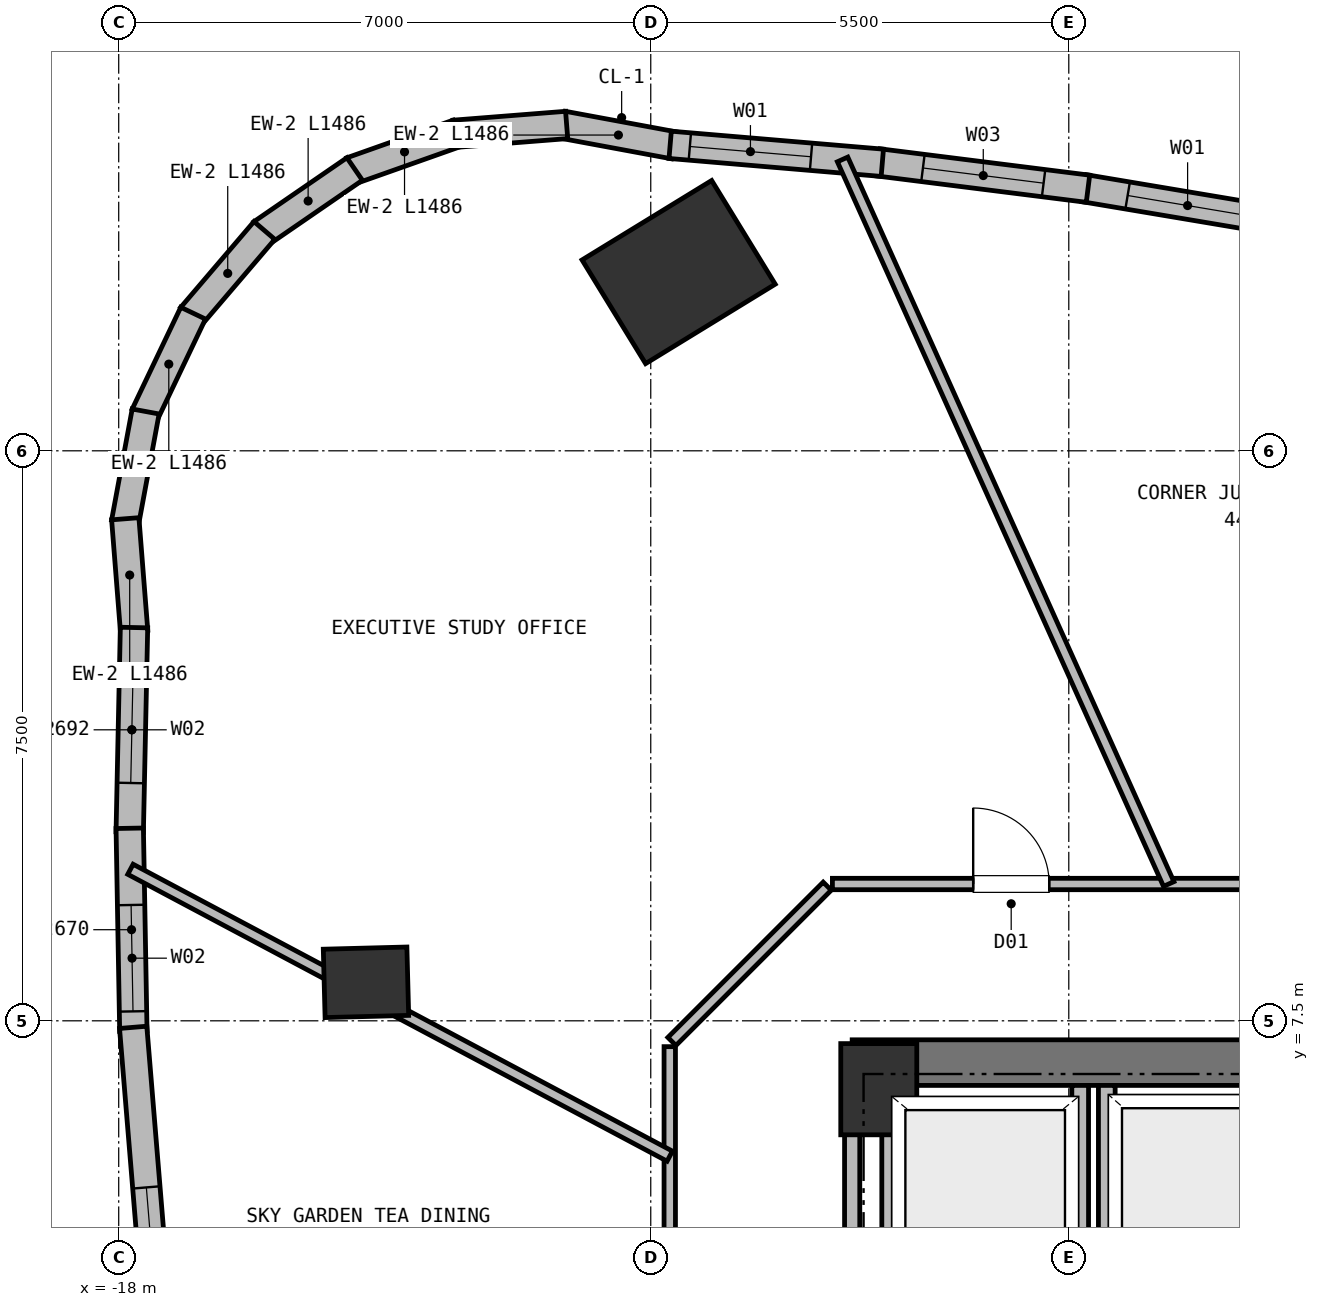
"""IFC4 building model, lengths in metres.
Left out: names, types, materials, properties, quantities, classifications, styles, units other than length and angle.
Written with IfcOpenShell. Run it as: python <this file> out.ifc"""

import sys

from ifc_helpers import new_model, si_unit, direction, frame, frame_2d, origin, origin_2d, place, context, subcontext, project, spatial, rectangle, extrude, element, fill, save


model = new_model("IFC4")
c1 = context("Model", 3, precision=1e-05, world=origin(), true_north=direction((0.0, 1.0)))
c2 = subcontext(c1, "Body", "Model", "MODEL_VIEW")
j1 = project(units=[si_unit("LENGTHUNIT", "METRE"), si_unit("PLANEANGLEUNIT", "RADIAN")], contexts=[c1])
p1 = place(None, origin())
s1 = spatial("IfcSite", under=j1, at=p1, CompositionType="ELEMENT")
p2 = place(p1, origin())
s2 = spatial("IfcBuilding", under=s1, at=p2, CompositionType="ELEMENT")
p3 = place(p2, frame((0.0, 0.0, 164.75)))
s3 = spatial("IfcBuildingStorey", under=s2, at=p3, CompositionType="ELEMENT", Elevation=164.75)
p4 = place(p3, frame((-8.0, 6.6, 0.0), z_axis=(0.0, 0.0, 1.0), x_axis=(1.0, 0.0, 0.0)))
e1 = element("IfcColumn", 1, at=p4, inside=s3, PredefinedType="COLUMN", context=c2, shape_type="SweptSolid", body=[
    extrude(rectangle(XDim=1.0, YDim=1.2, at=origin_2d()), origin(), (0.0, 0.0, 1.0), 3.75),
])
p5 = place(p3, frame((-8.35, 6.95, 0.0), z_axis=(0.0, 0.0, 1.0), x_axis=(1.0, 0.0, 0.0)))
e2 = element("IfcWall", 2, at=p5, inside=s3, PredefinedType="SHEAR", context=c2, shape_type="SweptSolid", body=[
    extrude(rectangle(XDim=16.7, YDim=0.6, at=frame_2d((8.35, 0.0))), origin(), (0.0, 0.0, 1.0), 3.44),
])
p6 = place(p3, frame((-10.633, 17.352, 0.0), z_axis=(0.0, 0.0, 1.0), x_axis=(-0.522498564716, 0.852640164354, 0.0)))
e3 = element("IfcColumn", 3, at=p6, inside=s3, PredefinedType="COLUMN", context=c2, shape_type="SweptSolid", body=[
    extrude(rectangle(XDim=1.6, YDim=2.0, at=origin_2d()), origin(), (0.0, 0.0, 1.0), 3.75),
])
p7 = place(p3, frame((-14.747, 8.007, 0.0), z_axis=(0.0, 0.0, 1.0), x_axis=(-0.026176948308, 0.999657324976, 0.0)))
e4 = element("IfcColumn", 4, at=p7, inside=s3, PredefinedType="COLUMN", context=c2, shape_type="SweptSolid", body=[
    extrude(rectangle(XDim=0.9, YDim=1.1, at=origin_2d()), origin(), (0.0, 0.0, 1.0), 3.75),
])
for number, where, z_axis, x_axis in (
    (5, (-12.156, 19.29, 0.0), (0.0, 0.0, 1.0), (0.983, -0.182, 0.0)),
    (6, (-13.588, 19.171, 0.0), (0.0, 0.0, 1.0), (0.997, 0.079, 0.0)),
):
    element("IfcWall", number, at=place(p3, frame(where, z_axis=z_axis, x_axis=x_axis)), inside=s3, PredefinedType="SOLIDWALL", context=c2, shape_type="SweptSolid", body=[
        extrude(rectangle(XDim=1.486, YDim=0.36, at=frame_2d((0.743, 0.0))), origin(), (0.0, 0.0, 1.0), 3.44),
    ])
p8 = place(p3, frame((-14.94, 18.685, 0.0), z_axis=(0.0, 0.0, 1.0), x_axis=(0.942653080659, 0.333774129501, 0.0)))
e7 = element("IfcWall", 7, at=p8, inside=s3, PredefinedType="SOLIDWALL", context=c2, shape_type="SweptSolid", body=[
    extrude(rectangle(XDim=1.486, YDim=0.36, at=frame_2d((0.743, 0.0))), origin(), (0.0, 0.0, 1.0), 3.44),
])
for number, where, z_axis, x_axis in (
    (8, (-16.12, 17.866, 0.0), (0.0, 0.0, 1.0), (0.824, 0.566, 0.0)),
    (9, (-17.048, 16.77, 0.0), (0.0, 0.0, 1.0), (0.649, 0.76, 0.0)),
    (10, (-17.661, 15.47, 0.0), (0.0, 0.0, 1.0), (0.431, 0.903, 0.0)),
):
    element("IfcWall", number, at=place(p3, frame(where, z_axis=z_axis, x_axis=x_axis)), inside=s3, PredefinedType="SOLIDWALL", context=c2, shape_type="SweptSolid", body=[
        extrude(rectangle(XDim=1.486, YDim=0.36, at=frame_2d((0.743, 0.0))), origin(), (0.0, 0.0, 1.0), 3.44),
    ])
p9 = place(p3, frame((-17.916, 14.056, 0.0), z_axis=(0.0, 0.0, 1.0), x_axis=(0.182254034422, 0.983251476956, 0.0)))
e11 = element("IfcWall", 11, at=p9, inside=s3, PredefinedType="SOLIDWALL", context=c2, shape_type="SweptSolid", body=[
    extrude(rectangle(XDim=1.486, YDim=0.36, at=frame_2d((0.743, 0.0))), origin(), (0.0, 0.0, 1.0), 3.44),
])
p10 = place(p3, frame((-17.797, 12.625, 0.0), z_axis=(0.0, 0.0, 1.0), x_axis=(-0.078543482647, 0.996910688745, 0.0)))
e12 = element("IfcWall", 12, at=p10, inside=s3, PredefinedType="SOLIDWALL", context=c2, shape_type="SweptSolid", body=[
    extrude(rectangle(XDim=1.486, YDim=0.36, at=frame_2d((0.743, 0.0))), origin(), (0.0, 0.0, 1.0), 3.44),
])
p11 = place(p3, frame((-17.855, 9.983, 0.0), z_axis=(0.0, 0.0, 1.0), x_axis=(0.021042241885, 0.999778587516, 0.0)))
e13 = element("IfcWall", 13, at=p11, inside=s3, PredefinedType="SOLIDWALL", context=c2, shape_type="SweptSolid", body=[
    extrude(rectangle(XDim=2.692, YDim=0.36, at=frame_2d((1.346, 0.0))), origin(), (0.0, 0.0, 1.0), 3.44),
])
p12 = place(p11, frame((0.646, 0.0, 0.72)))
e14 = element("IfcOpeningElement", 14, at=p12, cuts=e13, PredefinedType="OPENING", context=c2, shape_type="SweptSolid", body=[
    extrude(rectangle(XDim=1.4, YDim=1.84, at=frame_2d((0.7, 0.92))), frame((0.0, 0.19, 0.0), z_axis=(0.0, -1.0, 0.0), x_axis=(1.0, 0.0, 0.0)), (0.0, 0.0, 1.0), 0.38),
])
p13 = place(p3, frame((-17.807, 7.364, 0.0), z_axis=(0.0, 0.0, 1.0), x_axis=(-0.017833073331, 0.999840978104, 0.0)))
e15 = element("IfcWall", 15, at=p13, inside=s3, PredefinedType="SOLIDWALL", context=c2, shape_type="SweptSolid", body=[
    extrude(rectangle(XDim=2.67, YDim=0.36, at=frame_2d((1.335, 0.0))), origin(), (0.0, 0.0, 1.0), 3.44),
])
p14 = place(p13, frame((0.26, 0.0, 0.72)))
e16 = element("IfcOpeningElement", 16, at=p14, cuts=e15, PredefinedType="OPENING", context=c2, shape_type="SweptSolid", body=[
    extrude(rectangle(XDim=1.4, YDim=1.84, at=frame_2d((0.7, 0.92))), frame((0.0, 0.19, 0.0), z_axis=(0.0, -1.0, 0.0), x_axis=(1.0, 0.0, 0.0)), (0.0, 0.0, 1.0), 0.38),
])
p15 = place(p3, frame((-17.332, 1.607, 0.0), z_axis=(0.0, 0.0, 1.0), x_axis=(-0.082081459556, 0.996625623791, 0.0)))
e17 = element("IfcWall", 17, at=p15, inside=s3, PredefinedType="SOLIDWALL", context=c2, shape_type="SweptSolid", body=[
    extrude(rectangle(XDim=5.827, YDim=0.36, at=frame_2d((2.914, 0.0))), origin(), (0.0, 0.0, 1.0), 3.44),
])
p16 = place(p15, frame((2.113, 0.0, 0.72)))
e18 = element("IfcOpeningElement", 18, at=p16, cuts=e17, PredefinedType="OPENING", context=c2, shape_type="SweptSolid", body=[
    extrude(rectangle(XDim=1.6, YDim=1.88, at=frame_2d((0.8, 0.94))), frame((0.0, 0.19, 0.0), z_axis=(0.0, -1.0, 0.0), x_axis=(1.0, 0.0, 0.0)), (0.0, 0.0, 1.0), 0.38),
])
p17 = place(p3, frame((-5.297, 18.455, 0.0), z_axis=(0.0, 0.0, 1.0), x_axis=(0.986180213116, -0.16567615175, 0.0)))
e19 = element("IfcWall", 19, at=p17, inside=s3, PredefinedType="SOLIDWALL", context=c2, shape_type="SweptSolid", body=[
    extrude(rectangle(XDim=2.759, YDim=0.36, at=frame_2d((1.379, 0.0))), origin(), (0.0, 0.0, 1.0), 3.44),
])
p18 = place(p17, frame((0.579, 0.0, 0.72)))
e20 = element("IfcOpeningElement", 20, at=p18, cuts=e19, PredefinedType="OPENING", context=c2, shape_type="SweptSolid", body=[
    extrude(rectangle(XDim=1.6, YDim=1.88, at=frame_2d((0.8, 0.94))), frame((0.0, 0.19, 0.0), z_axis=(0.0, -1.0, 0.0), x_axis=(1.0, 0.0, 0.0)), (0.0, 0.0, 1.0), 0.38),
])
p19 = place(p3, frame((-8.003, 18.795, 0.0), z_axis=(0.0, 0.0, 1.0), x_axis=(0.992180208289, -0.124813598137, 0.0)))
e21 = element("IfcWall", 21, at=p19, inside=s3, PredefinedType="SOLIDWALL", context=c2, shape_type="SweptSolid", body=[
    extrude(rectangle(XDim=2.778, YDim=0.36, at=frame_2d((1.389, 0.0))), origin(), (0.0, 0.0, 1.0), 3.44),
])
p20 = place(p19, frame((0.589, 0.0, 0.72)))
e22 = element("IfcOpeningElement", 22, at=p20, cuts=e21, PredefinedType="OPENING", context=c2, shape_type="SweptSolid", body=[
    extrude(rectangle(XDim=1.6, YDim=1.88, at=frame_2d((0.8, 0.94))), frame((0.0, 0.19, 0.0), z_axis=(0.0, -1.0, 0.0), x_axis=(1.0, 0.0, 0.0)), (0.0, 0.0, 1.0), 0.38),
])
p21 = place(p3, frame((-10.745, 19.026, 0.0), z_axis=(0.0, 0.0, 1.0), x_axis=(0.996434889396, -0.084365343561, 0.0)))
e23 = element("IfcWall", 23, at=p21, inside=s3, PredefinedType="SOLIDWALL", context=c2, shape_type="SweptSolid", body=[
    extrude(rectangle(XDim=2.801, YDim=0.36, at=frame_2d((1.401, 0.0))), origin(), (0.0, 0.0, 1.0), 3.44),
])
p22 = place(p21, frame((0.26, 0.0, 0.72)))
e24 = element("IfcOpeningElement", 24, at=p22, cuts=e23, PredefinedType="OPENING", context=c2, shape_type="SweptSolid", body=[
    extrude(rectangle(XDim=1.6, YDim=1.88, at=frame_2d((0.8, 0.94))), frame((0.0, 0.19, 0.0), z_axis=(0.0, -1.0, 0.0), x_axis=(1.0, 0.0, 0.0)), (0.0, 0.0, 1.0), 0.38),
])
p23 = place(p3, frame((-7.85, 4.57, 0.0), z_axis=(0.0, 0.0, 1.0), x_axis=(0.0, 1.0, 0.0)))
e25 = element("IfcWall", 25, at=p23, inside=s3, PredefinedType="PARTITIONING", context=c2, shape_type="SweptSolid", body=[
    extrude(rectangle(XDim=2.08, YDim=0.22, at=frame_2d((1.04, 0.0))), origin(), (0.0, 0.0, 1.0), 3.06),
])
for number, where, z_axis, x_axis in (
    (26, (-5.35, 4.57, 0.0), (0.0, 0.0, 1.0), (0.0, 1.0, 0.0)),
    (27, (-5.0, 4.57, 0.0), (0.0, 0.0, 1.0), (0.0, 1.0, 0.0)),
):
    element("IfcWall", number, at=place(p3, frame(where, z_axis=z_axis, x_axis=x_axis)), inside=s3, PredefinedType="PARTITIONING", context=c2, shape_type="SweptSolid", body=[
        extrude(rectangle(XDim=2.08, YDim=0.22, at=frame_2d((1.04, 0.0))), origin(), (0.0, 0.0, 1.0), 3.44),
    ])
p24 = place(p3, frame((-8.35, 1.15, 0.0), z_axis=(0.0, 0.0, 1.0), x_axis=(0.0, 1.0, 0.0)))
e28 = element("IfcWall", 28, at=p24, inside=s3, PredefinedType="PARTITIONING", context=c2, shape_type="SweptSolid", body=[
    extrude(rectangle(XDim=5.4, YDim=0.2, at=frame_2d((2.7, 0.0))), origin(), (0.0, 0.0, 1.0), 3.44),
])
p25 = place(p24, frame((0.95, 0.0, 0.0)))
e29 = element("IfcOpeningElement", 29, at=p25, cuts=e28, PredefinedType="OPENING", context=c2, shape_type="SweptSolid", body=[
    extrude(rectangle(XDim=1.15, YDim=2.15, at=frame_2d((0.575, 1.075))), frame((0.0, 0.11, 0.0), z_axis=(0.0, -1.0, 0.0), x_axis=(1.0, 0.0, 0.0)), (0.0, 0.0, 1.0), 0.22),
])
p26 = place(p3, frame((-8.61, 9.3, 0.0), z_axis=(0.0, 0.0, 1.0), x_axis=(1.0, 0.0, 0.0)))
e30 = element("IfcWall", 30, at=p26, inside=s3, PredefinedType="PARTITIONING", context=c2, shape_type="SweptSolid", body=[
    extrude(rectangle(XDim=17.22, YDim=0.15, at=frame_2d((8.61, 0.0))), origin(), (0.0, 0.0, 1.0), 3.44),
])
p27 = place(p26, frame((5.472, 0.0, 0.0)))
e31 = element("IfcOpeningElement", 31, at=p27, cuts=e30, PredefinedType="OPENING", context=c2, shape_type="SweptSolid", body=[
    extrude(rectangle(XDim=1.06, YDim=2.15, at=frame_2d((0.53, 1.075))), frame((0.0, 0.085, 0.0), z_axis=(0.0, -1.0, 0.0), x_axis=(1.0, 0.0, 0.0)), (0.0, 0.0, 1.0), 0.17),
])
p28 = place(p26, frame((13.018, 0.0, 0.0)))
e32 = element("IfcOpeningElement", 32, at=p28, cuts=e30, PredefinedType="OPENING", context=c2, shape_type="SweptSolid", body=[
    extrude(rectangle(XDim=1.0, YDim=2.15, at=frame_2d((0.5, 1.075))), frame((0.0, 0.085, 0.0), z_axis=(0.0, -1.0, 0.0), x_axis=(1.0, 0.0, 0.0)), (0.0, 0.0, 1.0), 0.17),
])
p29 = place(p26, frame((1.852, 0.0, 0.0)))
e33 = element("IfcOpeningElement", 33, at=p29, cuts=e30, PredefinedType="OPENING", context=c2, shape_type="SweptSolid", body=[
    extrude(rectangle(XDim=1.0, YDim=2.15, at=frame_2d((0.5, 1.075))), frame((0.0, 0.085, 0.0), z_axis=(0.0, -1.0, 0.0), x_axis=(1.0, 0.0, 0.0)), (0.0, 0.0, 1.0), 0.17),
])
p30 = place(p3, frame((-10.722, 7.228, 0.0), z_axis=(0.0, 0.0, 1.0), x_axis=(0.707106781187, 0.707106781187, 0.0)))
e34 = element("IfcWall", 34, at=p30, inside=s3, PredefinedType="PARTITIONING", context=c2, shape_type="SweptSolid", body=[
    extrude(rectangle(XDim=2.89, YDim=0.15, at=frame_2d((1.445, 0.0))), origin(), (0.0, 0.0, 1.0), 3.44),
])
p31 = place(p3, frame((-10.75, -5.76, 0.0), z_axis=(0.0, 0.0, 1.0), x_axis=(0.0, 1.0, 0.0)))
e35 = element("IfcWall", 35, at=p31, inside=s3, PredefinedType="PARTITIONING", context=c2, shape_type="SweptSolid", body=[
    extrude(rectangle(XDim=12.92, YDim=0.15, at=frame_2d((6.46, 0.0))), origin(), (0.0, 0.0, 1.0), 3.44),
])
p32 = place(p31, frame((5.95, 0.0, 0.0)))
e36 = element("IfcOpeningElement", 36, at=p32, cuts=e35, PredefinedType="OPENING", context=c2, shape_type="SweptSolid", body=[
    extrude(rectangle(XDim=1.0, YDim=2.15, at=frame_2d((0.5, 1.075))), frame((0.0, 0.085, 0.0), z_axis=(0.0, -1.0, 0.0), x_axis=(1.0, 0.0, 0.0)), (0.0, 0.0, 1.0), 0.17),
])
p33 = place(p3, frame((-4.185, 9.3, 0.0), z_axis=(0.0, 0.0, 1.0), x_axis=(-0.41041322582, 0.9118996568, 0.0)))
e37 = element("IfcWall", 37, at=p33, inside=s3, PredefinedType="PARTITIONING", context=c2, shape_type="SweptSolid", body=[
    extrude(rectangle(XDim=10.455, YDim=0.15, at=frame_2d((5.228, 0.0))), origin(), (0.0, 0.0, 1.0), 3.44),
])
p34 = place(p3, frame((-10.75, 5.719, 0.0), z_axis=(0.0, 0.0, 1.0), x_axis=(-0.882835139179, 0.469682996318, 0.0)))
e38 = element("IfcWall", 38, at=p34, inside=s3, PredefinedType="PARTITIONING", context=c2, shape_type="SweptSolid", body=[
    extrude(rectangle(XDim=8.037, YDim=0.15, at=frame_2d((4.019, 0.0))), origin(), (0.0, 0.0, 1.0), 3.44),
])
p35 = place(p12, origin())
e39 = element("IfcWindow", 39, at=p35, inside=s3, PartitioningType="SINGLE_PANEL", PredefinedType="WINDOW", context=c2, shape_type="SweptSolid", body=[
    extrude(rectangle(XDim=1.4, YDim=1.84, at=frame_2d((0.7, 0.92))), frame((0.0, 0.03, 0.0), z_axis=(0.0, -1.0, 0.0), x_axis=(1.0, 0.0, 0.0)), (0.0, 0.0, 1.0), 0.06),
])
fill(e14, e39)
p36 = place(p14, origin())
e40 = element("IfcWindow", 40, at=p36, inside=s3, PartitioningType="SINGLE_PANEL", PredefinedType="WINDOW", context=c2, shape_type="SweptSolid", body=[
    extrude(rectangle(XDim=1.4, YDim=1.84, at=frame_2d((0.7, 0.92))), frame((0.0, 0.03, 0.0), z_axis=(0.0, -1.0, 0.0), x_axis=(1.0, 0.0, 0.0)), (0.0, 0.0, 1.0), 0.06),
])
fill(e16, e40)
p37 = place(p16, origin())
e41 = element("IfcWindow", 41, at=p37, inside=s3, PartitioningType="SINGLE_PANEL", PredefinedType="WINDOW", context=c2, shape_type="SweptSolid", body=[
    extrude(rectangle(XDim=1.6, YDim=1.88, at=frame_2d((0.8, 0.94))), frame((0.0, 0.03, 0.0), z_axis=(0.0, -1.0, 0.0), x_axis=(1.0, 0.0, 0.0)), (0.0, 0.0, 1.0), 0.06),
])
fill(e18, e41)
p38 = place(p18, origin())
e42 = element("IfcWindow", 42, at=p38, inside=s3, PartitioningType="SINGLE_PANEL", PredefinedType="WINDOW", context=c2, shape_type="SweptSolid", body=[
    extrude(rectangle(XDim=1.6, YDim=1.88, at=frame_2d((0.8, 0.94))), frame((0.0, 0.03, 0.0), z_axis=(0.0, -1.0, 0.0), x_axis=(1.0, 0.0, 0.0)), (0.0, 0.0, 1.0), 0.06),
])
fill(e20, e42)
p39 = place(p20, origin())
e43 = element("IfcWindow", 43, at=p39, inside=s3, PartitioningType="SINGLE_PANEL", PredefinedType="WINDOW", context=c2, shape_type="SweptSolid", body=[
    extrude(rectangle(XDim=1.6, YDim=1.88, at=frame_2d((0.8, 0.94))), frame((0.0, 0.03, 0.0), z_axis=(0.0, -1.0, 0.0), x_axis=(1.0, 0.0, 0.0)), (0.0, 0.0, 1.0), 0.06),
])
fill(e22, e43)
p40 = place(p22, origin())
e44 = element("IfcWindow", 44, at=p40, inside=s3, PartitioningType="SINGLE_PANEL", PredefinedType="WINDOW", context=c2, shape_type="SweptSolid", body=[
    extrude(rectangle(XDim=1.6, YDim=1.88, at=frame_2d((0.8, 0.94))), frame((0.0, 0.03, 0.0), z_axis=(0.0, -1.0, 0.0), x_axis=(1.0, 0.0, 0.0)), (0.0, 0.0, 1.0), 0.06),
])
fill(e24, e44)
p41 = place(p29, origin())
e45 = element("IfcDoor", 45, at=p41, inside=s3, OperationType="SINGLE_SWING_LEFT", PredefinedType="DOOR", context=c2, shape_type="SweptSolid", body=[
    extrude(rectangle(XDim=1.0, YDim=2.15, at=frame_2d((0.5, 1.075))), frame((0.0, 0.025, 0.0), z_axis=(0.0, -1.0, 0.0), x_axis=(1.0, 0.0, 0.0)), (0.0, 0.0, 1.0), 0.05),
])
fill(e33, e45)
save(model, sys.argv[1])
